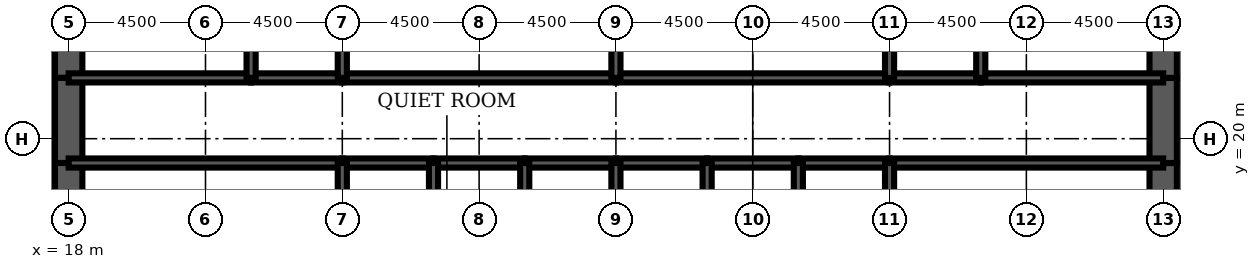
"""IFC4 building model, lengths in metres.
Left out: names, types, materials, properties, quantities, classifications, styles, units other than length and angle.
Written with IfcOpenShell. Run it as: python <this file> out.ifc"""

import sys

from ifc_helpers import new_model, si_unit, direction, frame, frame_2d, origin, place, context, subcontext, project, spatial, rectangle, extrude, element, fill, save


model = new_model("IFC4")
c1 = context("Model", 3, precision=1e-05, world=origin(), true_north=direction((0.0, 1.0)))
c2 = subcontext(c1, "Body", "Model", "MODEL_VIEW")
j1 = project(units=[si_unit("LENGTHUNIT", "METRE"), si_unit("PLANEANGLEUNIT", "RADIAN")], contexts=[c1])
p1 = place(None, origin())
s1 = spatial("IfcSite", under=j1, at=p1, CompositionType="ELEMENT")
p2 = place(p1, origin())
s2 = spatial("IfcBuilding", under=s1, at=p2, CompositionType="ELEMENT")
p3 = place(p2, frame((0.0, 0.0, 121.5)))
s3 = spatial("IfcBuildingStorey", under=s2, at=p3, CompositionType="ELEMENT", Elevation=121.5)
p4 = place(p3, frame((18.0, 26.0, 0.0), z_axis=(0.0, 0.0, 1.0), x_axis=(0.0, -1.0, 0.0)))
e1 = element("IfcWall", 1, at=p4, inside=s3, PredefinedType="SHEAR", context=c2, shape_type="SweptSolid", body=[
    extrude(rectangle(XDim=4.0, YDim=0.9, at=frame_2d((2.0, 0.0))), origin(), (0.0, 0.0, 1.0), 4.2),
])
p5 = place(p3, frame((18.0, 22.0, 0.0), z_axis=(0.0, 0.0, 1.0), x_axis=(0.0, -1.0, 0.0)))
e2 = element("IfcWall", 2, at=p5, inside=s3, PredefinedType="SHEAR", context=c2, shape_type="SweptSolid", body=[
    extrude(rectangle(XDim=2.8, YDim=0.9, at=frame_2d((1.4, 0.0))), origin(), (0.0, 0.0, 1.0), 4.2),
])
p6 = place(p5, frame((0.6, 0.0, 0.0)))
e3 = element("IfcOpeningElement", 3, at=p6, cuts=e2, PredefinedType="OPENING", context=c2, shape_type="SweptSolid", body=[
    extrude(rectangle(XDim=1.8, YDim=2.1, at=frame_2d((0.9, 1.05))), frame((0.0, 0.46, 0.0), z_axis=(0.0, -1.0, 0.0), x_axis=(1.0, 0.0, 0.0)), (0.0, 0.0, 1.0), 0.92),
])
for number, where, z_axis, x_axis in (
    (4, (18.0, 19.2, 0.0), (0.0, 0.0, 1.0), (0.0, -1.0, 0.0)),
    (5, (54.0, 16.0, 0.0), (0.0, 0.0, 1.0), (0.0, 1.0, 0.0)),
):
    element("IfcWall", number, at=place(p3, frame(where, z_axis=z_axis, x_axis=x_axis)), inside=s3, PredefinedType="SHEAR", context=c2, shape_type="SweptSolid", body=[
        extrude(rectangle(XDim=3.2, YDim=0.9, at=frame_2d((1.6, 0.0))), origin(), (0.0, 0.0, 1.0), 4.2),
    ])
p7 = place(p3, frame((54.0, 19.2, 0.0), z_axis=(0.0, 0.0, 1.0), x_axis=(0.0, 1.0, 0.0)))
e6 = element("IfcWall", 6, at=p7, inside=s3, PredefinedType="SHEAR", context=c2, shape_type="SweptSolid", body=[
    extrude(rectangle(XDim=2.8, YDim=0.9, at=frame_2d((1.4, 0.0))), origin(), (0.0, 0.0, 1.0), 4.2),
])
p8 = place(p7, frame((0.4, 0.0, 0.0)))
e7 = element("IfcOpeningElement", 7, at=p8, cuts=e6, PredefinedType="OPENING", context=c2, shape_type="SweptSolid", body=[
    extrude(rectangle(XDim=1.8, YDim=2.1, at=frame_2d((0.9, 1.05))), frame((0.0, 0.46, 0.0), z_axis=(0.0, -1.0, 0.0), x_axis=(1.0, 0.0, 0.0)), (0.0, 0.0, 1.0), 0.92),
])
p9 = place(p3, frame((54.0, 22.0, 0.0), z_axis=(0.0, 0.0, 1.0), x_axis=(0.0, 1.0, 0.0)))
e8 = element("IfcWall", 8, at=p9, inside=s3, PredefinedType="SHEAR", context=c2, shape_type="SweptSolid", body=[
    extrude(rectangle(XDim=4.0, YDim=0.9, at=frame_2d((2.0, 0.0))), origin(), (0.0, 0.0, 1.0), 4.2),
])
p10 = place(p3, frame((18.0, 19.2, 0.0), z_axis=(0.0, 0.0, 1.0), x_axis=(1.0, 0.0, 0.0)))
e9 = element("IfcWall", 9, at=p10, inside=s3, PredefinedType="SOLIDWALL", context=c2, shape_type="SweptSolid", body=[
    extrude(rectangle(XDim=9.0, YDim=0.3, at=frame_2d((4.5, 0.0))), origin(), (0.0, 0.0, 1.0), 4.2),
])
p11 = place(p10, frame((0.65, 0.0, 0.0)))
e10 = element("IfcOpeningElement", 10, at=p11, cuts=e9, PredefinedType="OPENING", context=c2, shape_type="SweptSolid", body=[
    extrude(rectangle(XDim=1.0, YDim=2.1, at=frame_2d((0.5, 1.05))), frame((0.0, 0.16, 0.0), z_axis=(0.0, -1.0, 0.0), x_axis=(1.0, 0.0, 0.0)), (0.0, 0.0, 1.0), 0.32),
])
p12 = place(p3, frame((27.0, 19.2, 0.0), z_axis=(0.0, 0.0, 1.0), x_axis=(1.0, 0.0, 0.0)))
e11 = element("IfcWall", 11, at=p12, inside=s3, PredefinedType="SOLIDWALL", context=c2, shape_type="SweptSolid", body=[
    extrude(rectangle(XDim=3.0, YDim=0.3, at=frame_2d((1.5, 0.0))), origin(), (0.0, 0.0, 1.0), 4.2),
])
p13 = place(p12, frame((0.95, 0.0, 0.0)))
e12 = element("IfcOpeningElement", 12, at=p13, cuts=e11, PredefinedType="OPENING", context=c2, shape_type="SweptSolid", body=[
    extrude(rectangle(XDim=1.1, YDim=2.2, at=frame_2d((0.55, 1.1))), frame((0.0, 0.16, 0.0), z_axis=(0.0, -1.0, 0.0), x_axis=(1.0, 0.0, 0.0)), (0.0, 0.0, 1.0), 0.32),
])
p14 = place(p3, frame((30.0, 19.2, 0.0), z_axis=(0.0, 0.0, 1.0), x_axis=(1.0, 0.0, 0.0)))
e13 = element("IfcWall", 13, at=p14, inside=s3, PredefinedType="SOLIDWALL", context=c2, shape_type="SweptSolid", body=[
    extrude(rectangle(XDim=3.0, YDim=0.3, at=frame_2d((1.5, 0.0))), origin(), (0.0, 0.0, 1.0), 4.2),
])
p15 = place(p14, frame((0.95, 0.0, 0.0)))
e14 = element("IfcOpeningElement", 14, at=p15, cuts=e13, PredefinedType="OPENING", context=c2, shape_type="SweptSolid", body=[
    extrude(rectangle(XDim=1.1, YDim=2.2, at=frame_2d((0.55, 1.1))), frame((0.0, 0.16, 0.0), z_axis=(0.0, -1.0, 0.0), x_axis=(1.0, 0.0, 0.0)), (0.0, 0.0, 1.0), 0.32),
])
p16 = place(p3, frame((33.0, 19.2, 0.0), z_axis=(0.0, 0.0, 1.0), x_axis=(1.0, 0.0, 0.0)))
e15 = element("IfcWall", 15, at=p16, inside=s3, PredefinedType="SOLIDWALL", context=c2, shape_type="SweptSolid", body=[
    extrude(rectangle(XDim=3.0, YDim=0.3, at=frame_2d((1.5, 0.0))), origin(), (0.0, 0.0, 1.0), 4.2),
])
p17 = place(p16, frame((0.95, 0.0, 0.0)))
e16 = element("IfcOpeningElement", 16, at=p17, cuts=e15, PredefinedType="OPENING", context=c2, shape_type="SweptSolid", body=[
    extrude(rectangle(XDim=1.1, YDim=2.2, at=frame_2d((0.55, 1.1))), frame((0.0, 0.16, 0.0), z_axis=(0.0, -1.0, 0.0), x_axis=(1.0, 0.0, 0.0)), (0.0, 0.0, 1.0), 0.32),
])
p18 = place(p3, frame((36.0, 19.2, 0.0), z_axis=(0.0, 0.0, 1.0), x_axis=(1.0, 0.0, 0.0)))
e17 = element("IfcWall", 17, at=p18, inside=s3, PredefinedType="SOLIDWALL", context=c2, shape_type="SweptSolid", body=[
    extrude(rectangle(XDim=3.0, YDim=0.3, at=frame_2d((1.5, 0.0))), origin(), (0.0, 0.0, 1.0), 4.2),
])
p19 = place(p18, frame((0.95, 0.0, 0.0)))
e18 = element("IfcOpeningElement", 18, at=p19, cuts=e17, PredefinedType="OPENING", context=c2, shape_type="SweptSolid", body=[
    extrude(rectangle(XDim=1.1, YDim=2.2, at=frame_2d((0.55, 1.1))), frame((0.0, 0.16, 0.0), z_axis=(0.0, -1.0, 0.0), x_axis=(1.0, 0.0, 0.0)), (0.0, 0.0, 1.0), 0.32),
])
p20 = place(p3, frame((39.0, 19.2, 0.0), z_axis=(0.0, 0.0, 1.0), x_axis=(1.0, 0.0, 0.0)))
e19 = element("IfcWall", 19, at=p20, inside=s3, PredefinedType="SOLIDWALL", context=c2, shape_type="SweptSolid", body=[
    extrude(rectangle(XDim=3.0, YDim=0.3, at=frame_2d((1.5, 0.0))), origin(), (0.0, 0.0, 1.0), 4.2),
])
p21 = place(p20, frame((1.0, 0.0, 0.0)))
e20 = element("IfcOpeningElement", 20, at=p21, cuts=e19, PredefinedType="OPENING", context=c2, shape_type="SweptSolid", body=[
    extrude(rectangle(XDim=1.0, YDim=2.1, at=frame_2d((0.5, 1.05))), frame((0.0, 0.16, 0.0), z_axis=(0.0, -1.0, 0.0), x_axis=(1.0, 0.0, 0.0)), (0.0, 0.0, 1.0), 0.32),
])
p22 = place(p3, frame((42.0, 19.2, 0.0), z_axis=(0.0, 0.0, 1.0), x_axis=(1.0, 0.0, 0.0)))
e21 = element("IfcWall", 21, at=p22, inside=s3, PredefinedType="SOLIDWALL", context=c2, shape_type="SweptSolid", body=[
    extrude(rectangle(XDim=3.0, YDim=0.3, at=frame_2d((1.5, 0.0))), origin(), (0.0, 0.0, 1.0), 4.2),
])
p23 = place(p3, frame((45.0, 19.2, 0.0), z_axis=(0.0, 0.0, 1.0), x_axis=(1.0, 0.0, 0.0)))
e22 = element("IfcWall", 22, at=p23, inside=s3, PredefinedType="SOLIDWALL", context=c2, shape_type="SweptSolid", body=[
    extrude(rectangle(XDim=9.0, YDim=0.3, at=frame_2d((4.5, 0.0))), origin(), (0.0, 0.0, 1.0), 4.2),
])
p24 = place(p23, frame((7.35, 0.0, 0.0)))
e23 = element("IfcOpeningElement", 23, at=p24, cuts=e22, PredefinedType="OPENING", context=c2, shape_type="SweptSolid", body=[
    extrude(rectangle(XDim=1.0, YDim=2.1, at=frame_2d((0.5, 1.05))), frame((0.0, 0.16, 0.0), z_axis=(0.0, -1.0, 0.0), x_axis=(1.0, 0.0, 0.0)), (0.0, 0.0, 1.0), 0.32),
])
p25 = place(p3, frame((18.0, 22.0, 0.0), z_axis=(0.0, 0.0, 1.0), x_axis=(1.0, 0.0, 0.0)))
e24 = element("IfcWall", 24, at=p25, inside=s3, PredefinedType="SOLIDWALL", context=c2, shape_type="SweptSolid", body=[
    extrude(rectangle(XDim=6.0, YDim=0.3, at=frame_2d((3.0, 0.0))), origin(), (0.0, 0.0, 1.0), 4.2),
])
p26 = place(p25, frame((4.4, 0.0, 0.0)))
e25 = element("IfcOpeningElement", 25, at=p26, cuts=e24, PredefinedType="OPENING", context=c2, shape_type="SweptSolid", body=[
    extrude(rectangle(XDim=1.0, YDim=2.1, at=frame_2d((0.5, 1.05))), frame((0.0, 0.16, 0.0), z_axis=(0.0, -1.0, 0.0), x_axis=(1.0, 0.0, 0.0)), (0.0, 0.0, 1.0), 0.32),
])
p27 = place(p25, frame((0.85, 0.0, 0.0)))
e26 = element("IfcOpeningElement", 26, at=p27, cuts=e24, PredefinedType="OPENING", context=c2, shape_type="SweptSolid", body=[
    extrude(rectangle(XDim=1.0, YDim=2.1, at=frame_2d((0.5, 1.05))), frame((0.0, 0.16, 0.0), z_axis=(0.0, -1.0, 0.0), x_axis=(1.0, 0.0, 0.0)), (0.0, 0.0, 1.0), 0.32),
])
p28 = place(p3, frame((24.0, 22.0, 0.0), z_axis=(0.0, 0.0, 1.0), x_axis=(1.0, 0.0, 0.0)))
e27 = element("IfcWall", 27, at=p28, inside=s3, PredefinedType="SOLIDWALL", context=c2, shape_type="SweptSolid", body=[
    extrude(rectangle(XDim=3.0, YDim=0.3, at=frame_2d((1.5, 0.0))), origin(), (0.0, 0.0, 1.0), 4.2),
])
p29 = place(p28, frame((1.0, 0.0, 0.0)))
e28 = element("IfcOpeningElement", 28, at=p29, cuts=e27, PredefinedType="OPENING", context=c2, shape_type="SweptSolid", body=[
    extrude(rectangle(XDim=1.0, YDim=2.1, at=frame_2d((0.5, 1.05))), frame((0.0, 0.16, 0.0), z_axis=(0.0, -1.0, 0.0), x_axis=(1.0, 0.0, 0.0)), (0.0, 0.0, 1.0), 0.32),
])
p30 = place(p3, frame((27.0, 22.0, 0.0), z_axis=(0.0, 0.0, 1.0), x_axis=(1.0, 0.0, 0.0)))
e29 = element("IfcWall", 29, at=p30, inside=s3, PredefinedType="SOLIDWALL", context=c2, shape_type="SweptSolid", body=[
    extrude(rectangle(XDim=9.0, YDim=0.3, at=frame_2d((4.5, 0.0))), origin(), (0.0, 0.0, 1.0), 4.2),
])
p31 = place(p30, frame((4.0, 0.0, 0.0)))
e30 = element("IfcOpeningElement", 30, at=p31, cuts=e29, PredefinedType="OPENING", context=c2, shape_type="SweptSolid", body=[
    extrude(rectangle(XDim=1.0, YDim=2.1, at=frame_2d((0.5, 1.05))), frame((0.0, 0.16, 0.0), z_axis=(0.0, -1.0, 0.0), x_axis=(1.0, 0.0, 0.0)), (0.0, 0.0, 1.0), 0.32),
])
p32 = place(p3, frame((36.0, 22.0, 0.0), z_axis=(0.0, 0.0, 1.0), x_axis=(1.0, 0.0, 0.0)))
e31 = element("IfcWall", 31, at=p32, inside=s3, PredefinedType="SOLIDWALL", context=c2, shape_type="SweptSolid", body=[
    extrude(rectangle(XDim=9.0, YDim=0.3, at=frame_2d((4.5, 0.0))), origin(), (0.0, 0.0, 1.0), 4.2),
])
p33 = place(p32, frame((4.0, 0.0, 0.0)))
e32 = element("IfcOpeningElement", 32, at=p33, cuts=e31, PredefinedType="OPENING", context=c2, shape_type="SweptSolid", body=[
    extrude(rectangle(XDim=1.0, YDim=2.1, at=frame_2d((0.5, 1.05))), frame((0.0, 0.16, 0.0), z_axis=(0.0, -1.0, 0.0), x_axis=(1.0, 0.0, 0.0)), (0.0, 0.0, 1.0), 0.32),
])
p34 = place(p3, frame((45.0, 22.0, 0.0), z_axis=(0.0, 0.0, 1.0), x_axis=(1.0, 0.0, 0.0)))
e33 = element("IfcWall", 33, at=p34, inside=s3, PredefinedType="SOLIDWALL", context=c2, shape_type="SweptSolid", body=[
    extrude(rectangle(XDim=3.0, YDim=0.3, at=frame_2d((1.5, 0.0))), origin(), (0.0, 0.0, 1.0), 4.2),
])
p35 = place(p34, frame((1.0, 0.0, 0.0)))
e34 = element("IfcOpeningElement", 34, at=p35, cuts=e33, PredefinedType="OPENING", context=c2, shape_type="SweptSolid", body=[
    extrude(rectangle(XDim=1.0, YDim=2.1, at=frame_2d((0.5, 1.05))), frame((0.0, 0.16, 0.0), z_axis=(0.0, -1.0, 0.0), x_axis=(1.0, 0.0, 0.0)), (0.0, 0.0, 1.0), 0.32),
])
p36 = place(p3, frame((48.0, 22.0, 0.0), z_axis=(0.0, 0.0, 1.0), x_axis=(1.0, 0.0, 0.0)))
e35 = element("IfcWall", 35, at=p36, inside=s3, PredefinedType="SOLIDWALL", context=c2, shape_type="SweptSolid", body=[
    extrude(rectangle(XDim=6.0, YDim=0.3, at=frame_2d((3.0, 0.0))), origin(), (0.0, 0.0, 1.0), 4.2),
])
p37 = place(p36, frame((2.0, 0.0, 0.0)))
e36 = element("IfcOpeningElement", 36, at=p37, cuts=e35, PredefinedType="OPENING", context=c2, shape_type="SweptSolid", body=[
    extrude(rectangle(XDim=1.0, YDim=2.1, at=frame_2d((0.5, 1.05))), frame((0.0, 0.16, 0.0), z_axis=(0.0, -1.0, 0.0), x_axis=(1.0, 0.0, 0.0)), (0.0, 0.0, 1.0), 0.32),
])
p38 = place(p36, frame((4.3, 0.0, 0.0)))
e37 = element("IfcOpeningElement", 37, at=p38, cuts=e35, PredefinedType="OPENING", context=c2, shape_type="SweptSolid", body=[
    extrude(rectangle(XDim=1.0, YDim=2.1, at=frame_2d((0.5, 1.05))), frame((0.0, 0.16, 0.0), z_axis=(0.0, -1.0, 0.0), x_axis=(1.0, 0.0, 0.0)), (0.0, 0.0, 1.0), 0.32),
])
for number, where, z_axis, x_axis in (
    (38, (27.0, 16.0, 0.0), (0.0, 0.0, 1.0), (0.0, 1.0, 0.0)),
    (39, (30.0, 16.0, 0.0), (0.0, 0.0, 1.0), (0.0, 1.0, 0.0)),
    (40, (33.0, 16.0, 0.0), (0.0, 0.0, 1.0), (0.0, 1.0, 0.0)),
    (41, (36.0, 16.0, 0.0), (0.0, 0.0, 1.0), (0.0, 1.0, 0.0)),
    (42, (39.0, 16.0, 0.0), (0.0, 0.0, 1.0), (0.0, 1.0, 0.0)),
    (43, (42.0, 16.0, 0.0), (0.0, 0.0, 1.0), (0.0, 1.0, 0.0)),
    (44, (45.0, 16.0, 0.0), (0.0, 0.0, 1.0), (0.0, 1.0, 0.0)),
):
    element("IfcWall", number, at=place(p3, frame(where, z_axis=z_axis, x_axis=x_axis)), inside=s3, PredefinedType="SOLIDWALL", context=c2, shape_type="SweptSolid", body=[
        extrude(rectangle(XDim=3.2, YDim=0.3, at=frame_2d((1.6, 0.0))), origin(), (0.0, 0.0, 1.0), 4.2),
    ])
for number, where, z_axis, x_axis in (
    (45, (24.0, 22.0, 0.0), (0.0, 0.0, 1.0), (0.0, 1.0, 0.0)),
    (46, (27.0, 22.0, 0.0), (0.0, 0.0, 1.0), (0.0, 1.0, 0.0)),
    (47, (36.0, 22.0, 0.0), (0.0, 0.0, 1.0), (0.0, 1.0, 0.0)),
    (48, (45.0, 22.0, 0.0), (0.0, 0.0, 1.0), (0.0, 1.0, 0.0)),
    (49, (48.0, 22.0, 0.0), (0.0, 0.0, 1.0), (0.0, 1.0, 0.0)),
):
    element("IfcWall", number, at=place(p3, frame(where, z_axis=z_axis, x_axis=x_axis)), inside=s3, PredefinedType="SOLIDWALL", context=c2, shape_type="SweptSolid", body=[
        extrude(rectangle(XDim=4.0, YDim=0.3, at=frame_2d((2.0, 0.0))), origin(), (0.0, 0.0, 1.0), 4.2),
    ])
p39 = place(p3, frame((42.0, 22.15, 0.0), z_axis=(0.0, 0.0, 1.0), x_axis=(0.0, 1.0, 0.0)))
e50 = element("IfcWall", 50, at=p39, inside=s3, PredefinedType="PARTITIONING", context=c2, shape_type="SweptSolid", body=[
    extrude(rectangle(XDim=3.7, YDim=0.15, at=frame_2d((1.85, 0.0))), origin(), (0.0, 0.0, 1.0), 3.0),
])
p40 = place(p39, frame((2.2, 0.0, 0.0)))
e51 = element("IfcOpeningElement", 51, at=p40, cuts=e50, PredefinedType="OPENING", context=c2, shape_type="SweptSolid", body=[
    extrude(rectangle(XDim=1.0, YDim=2.1, at=frame_2d((0.5, 1.05))), frame((0.0, 0.085, 0.0), z_axis=(0.0, -1.0, 0.0), x_axis=(1.0, 0.0, 0.0)), (0.0, 0.0, 1.0), 0.17),
])
for number, where, z_axis, x_axis in (
    (52, (20.325, 22.15, 0.0), (0.0, 0.0, 1.0), (0.0, 1.0, 0.0)),
    (53, (51.975, 22.15, 0.0), (0.0, 0.0, 1.0), (0.0, 1.0, 0.0)),
):
    element("IfcWall", number, at=place(p3, frame(where, z_axis=z_axis, x_axis=x_axis)), inside=s3, PredefinedType="PARTITIONING", context=c2, shape_type="SweptSolid", body=[
        extrude(rectangle(XDim=3.7, YDim=0.15, at=frame_2d((1.85, 0.0))), origin(), (0.0, 0.0, 1.0), 3.0),
    ])
p41 = place(p13, origin())
e54 = element("IfcDoor", 54, at=p41, inside=s3, OperationType="DOUBLE_DOOR_SLIDING", PredefinedType="USERDEFINED", context=c2, shape_type="SweptSolid", body=[
    extrude(rectangle(XDim=1.1, YDim=2.2, at=frame_2d((0.55, 1.1))), frame((0.0, 0.025, 0.0), z_axis=(0.0, -1.0, 0.0), x_axis=(1.0, 0.0, 0.0)), (0.0, 0.0, 1.0), 0.05),
])
fill(e12, e54)
p42 = place(p15, origin())
e55 = element("IfcDoor", 55, at=p42, inside=s3, OperationType="DOUBLE_DOOR_SLIDING", PredefinedType="USERDEFINED", context=c2, shape_type="SweptSolid", body=[
    extrude(rectangle(XDim=1.1, YDim=2.2, at=frame_2d((0.55, 1.1))), frame((0.0, 0.025, 0.0), z_axis=(0.0, -1.0, 0.0), x_axis=(1.0, 0.0, 0.0)), (0.0, 0.0, 1.0), 0.05),
])
fill(e14, e55)
p43 = place(p17, origin())
e56 = element("IfcDoor", 56, at=p43, inside=s3, OperationType="DOUBLE_DOOR_SLIDING", PredefinedType="USERDEFINED", context=c2, shape_type="SweptSolid", body=[
    extrude(rectangle(XDim=1.1, YDim=2.2, at=frame_2d((0.55, 1.1))), frame((0.0, 0.025, 0.0), z_axis=(0.0, -1.0, 0.0), x_axis=(1.0, 0.0, 0.0)), (0.0, 0.0, 1.0), 0.05),
])
fill(e16, e56)
p44 = place(p19, origin())
e57 = element("IfcDoor", 57, at=p44, inside=s3, OperationType="DOUBLE_DOOR_SLIDING", PredefinedType="USERDEFINED", context=c2, shape_type="SweptSolid", body=[
    extrude(rectangle(XDim=1.1, YDim=2.2, at=frame_2d((0.55, 1.1))), frame((0.0, 0.025, 0.0), z_axis=(0.0, -1.0, 0.0), x_axis=(1.0, 0.0, 0.0)), (0.0, 0.0, 1.0), 0.05),
])
fill(e18, e57)
p45 = place(p11, origin())
e58 = element("IfcDoor", 58, at=p45, inside=s3, OperationType="SINGLE_SWING_LEFT", PredefinedType="DOOR", context=c2, shape_type="SweptSolid", body=[
    extrude(rectangle(XDim=1.0, YDim=2.1, at=frame_2d((0.5, 1.05))), frame((0.0, 0.025, 0.0), z_axis=(0.0, -1.0, 0.0), x_axis=(1.0, 0.0, 0.0)), (0.0, 0.0, 1.0), 0.05),
])
fill(e10, e58)
p46 = place(p24, origin())
e59 = element("IfcDoor", 59, at=p46, inside=s3, OperationType="SINGLE_SWING_RIGHT", PredefinedType="DOOR", context=c2, shape_type="SweptSolid", body=[
    extrude(rectangle(XDim=1.0, YDim=2.1, at=frame_2d((0.5, 1.05))), frame((0.0, 0.025, 0.0), z_axis=(0.0, -1.0, 0.0), x_axis=(1.0, 0.0, 0.0)), (0.0, 0.0, 1.0), 0.05),
])
fill(e23, e59)
p47 = place(p6, origin())
e60 = element("IfcDoor", 60, at=p47, inside=s3, OperationType="SINGLE_SWING_LEFT", PredefinedType="DOOR", context=c2, shape_type="SweptSolid", body=[
    extrude(rectangle(XDim=1.8, YDim=2.1, at=frame_2d((0.9, 1.05))), frame((0.0, 0.45, 0.0), z_axis=(0.0, -1.0, 0.0), x_axis=(1.0, 0.0, 0.0)), (0.0, 0.0, 1.0), 0.899),
])
fill(e3, e60)
p48 = place(p8, origin())
e61 = element("IfcDoor", 61, at=p48, inside=s3, OperationType="SINGLE_SWING_LEFT", PredefinedType="DOOR", context=c2, shape_type="SweptSolid", body=[
    extrude(rectangle(XDim=1.8, YDim=2.1, at=frame_2d((0.9, 1.05))), frame((0.0, 0.45, 0.0), z_axis=(0.0, -1.0, 0.0), x_axis=(1.0, 0.0, 0.0)), (0.0, 0.0, 1.0), 0.899),
])
fill(e7, e61)
p49 = place(p26, origin())
e62 = element("IfcDoor", 62, at=p49, inside=s3, OperationType="SINGLE_SWING_RIGHT", PredefinedType="DOOR", context=c2, shape_type="SweptSolid", body=[
    extrude(rectangle(XDim=1.0, YDim=2.1, at=frame_2d((0.5, 1.05))), frame((0.0, 0.025, 0.0), z_axis=(0.0, -1.0, 0.0), x_axis=(1.0, 0.0, 0.0)), (0.0, 0.0, 1.0), 0.05),
])
fill(e25, e62)
p50 = place(p29, origin())
e63 = element("IfcDoor", 63, at=p50, inside=s3, OperationType="SINGLE_SWING_LEFT", PredefinedType="DOOR", context=c2, shape_type="SweptSolid", body=[
    extrude(rectangle(XDim=1.0, YDim=2.1, at=frame_2d((0.5, 1.05))), frame((0.0, 0.025, 0.0), z_axis=(0.0, -1.0, 0.0), x_axis=(1.0, 0.0, 0.0)), (0.0, 0.0, 1.0), 0.05),
])
fill(e28, e63)
p51 = place(p31, origin())
e64 = element("IfcDoor", 64, at=p51, inside=s3, OperationType="SINGLE_SWING_LEFT", PredefinedType="DOOR", context=c2, shape_type="SweptSolid", body=[
    extrude(rectangle(XDim=1.0, YDim=2.1, at=frame_2d((0.5, 1.05))), frame((0.0, 0.025, 0.0), z_axis=(0.0, -1.0, 0.0), x_axis=(1.0, 0.0, 0.0)), (0.0, 0.0, 1.0), 0.05),
])
fill(e30, e64)
p52 = place(p33, origin())
e65 = element("IfcDoor", 65, at=p52, inside=s3, OperationType="SINGLE_SWING_LEFT", PredefinedType="DOOR", context=c2, shape_type="SweptSolid", body=[
    extrude(rectangle(XDim=1.0, YDim=2.1, at=frame_2d((0.5, 1.05))), frame((0.0, 0.025, 0.0), z_axis=(0.0, -1.0, 0.0), x_axis=(1.0, 0.0, 0.0)), (0.0, 0.0, 1.0), 0.05),
])
fill(e32, e65)
p53 = place(p35, origin())
e66 = element("IfcDoor", 66, at=p53, inside=s3, OperationType="SINGLE_SWING_LEFT", PredefinedType="DOOR", context=c2, shape_type="SweptSolid", body=[
    extrude(rectangle(XDim=1.0, YDim=2.1, at=frame_2d((0.5, 1.05))), frame((0.0, 0.025, 0.0), z_axis=(0.0, -1.0, 0.0), x_axis=(1.0, 0.0, 0.0)), (0.0, 0.0, 1.0), 0.05),
])
fill(e34, e66)
p54 = place(p37, origin())
e67 = element("IfcDoor", 67, at=p54, inside=s3, OperationType="SINGLE_SWING_LEFT", PredefinedType="DOOR", context=c2, shape_type="SweptSolid", body=[
    extrude(rectangle(XDim=1.0, YDim=2.1, at=frame_2d((0.5, 1.05))), frame((0.0, 0.025, 0.0), z_axis=(0.0, -1.0, 0.0), x_axis=(1.0, 0.0, 0.0)), (0.0, 0.0, 1.0), 0.05),
])
fill(e36, e67)
p55 = place(p27, origin())
e68 = element("IfcDoor", 68, at=p55, inside=s3, OperationType="SINGLE_SWING_LEFT", PredefinedType="DOOR", context=c2, shape_type="SweptSolid", body=[
    extrude(rectangle(XDim=1.0, YDim=2.1, at=frame_2d((0.5, 1.05))), frame((0.0, 0.025, 0.0), z_axis=(0.0, -1.0, 0.0), x_axis=(1.0, 0.0, 0.0)), (0.0, 0.0, 1.0), 0.05),
])
fill(e26, e68)
p56 = place(p38, origin())
e69 = element("IfcDoor", 69, at=p56, inside=s3, OperationType="SINGLE_SWING_RIGHT", PredefinedType="DOOR", context=c2, shape_type="SweptSolid", body=[
    extrude(rectangle(XDim=1.0, YDim=2.1, at=frame_2d((0.5, 1.05))), frame((0.0, 0.025, 0.0), z_axis=(0.0, -1.0, 0.0), x_axis=(1.0, 0.0, 0.0)), (0.0, 0.0, 1.0), 0.05),
])
fill(e37, e69)
p57 = place(p21, origin())
e70 = element("IfcDoor", 70, at=p57, inside=s3, OperationType="SINGLE_SWING_LEFT", PredefinedType="DOOR", context=c2, shape_type="SweptSolid", body=[
    extrude(rectangle(XDim=1.0, YDim=2.1, at=frame_2d((0.5, 1.05))), frame((0.0, 0.025, 0.0), z_axis=(0.0, -1.0, 0.0), x_axis=(1.0, 0.0, 0.0)), (0.0, 0.0, 1.0), 0.05),
])
fill(e20, e70)
save(model, sys.argv[1])
